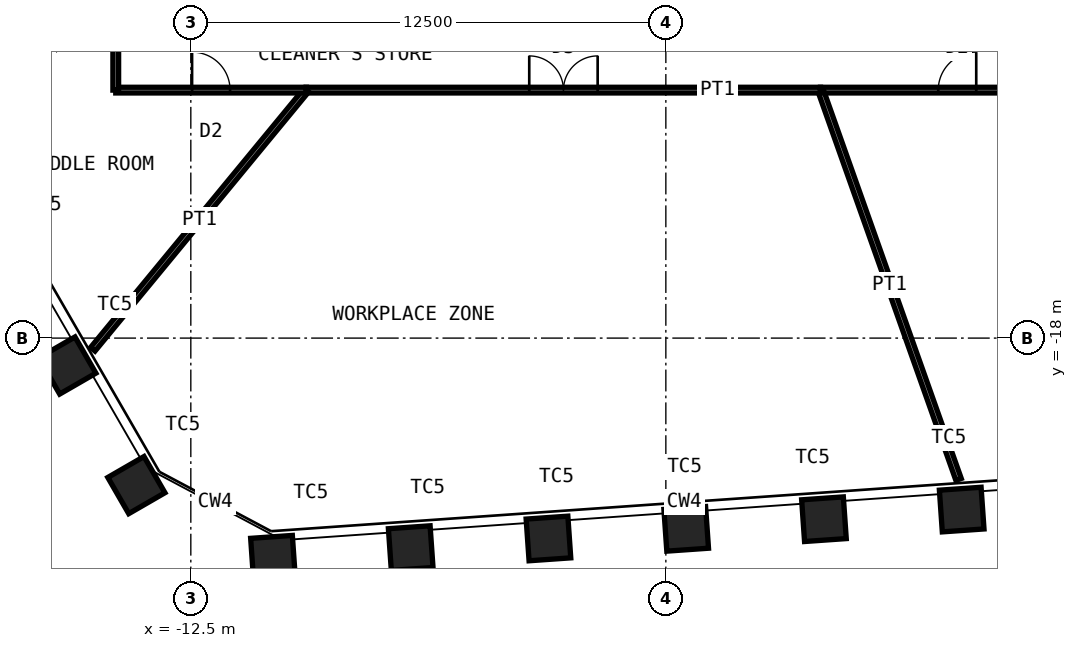
"""IFC4 building model, lengths in metres.
Left out: names, types, materials, properties, quantities, classifications, styles, units other than length and angle.
Written with IfcOpenShell. Run it as: python <this file> out.ifc"""

import sys

from ifc_helpers import new_model, si_unit, direction, frame, frame_2d, origin, origin_2d, place, context, subcontext, project, spatial, rectangle, hollow_rectangle, extrude, element, fill, save


model = new_model("IFC4")
c1 = context("Model", 3, precision=1e-05, world=origin(), true_north=direction((0.0, 1.0)))
c2 = subcontext(c1, "Body", "Model", "MODEL_VIEW")
j1 = project(units=[si_unit("LENGTHUNIT", "METRE"), si_unit("PLANEANGLEUNIT", "RADIAN")], contexts=[c1])
p1 = place(None, origin())
s1 = spatial("IfcSite", under=j1, at=p1, CompositionType="ELEMENT")
p2 = place(p1, origin())
s2 = spatial("IfcBuilding", under=s1, at=p2, CompositionType="ELEMENT")
p3 = place(p2, frame((0.0, 0.0, 193.0)))
s3 = spatial("IfcBuildingStorey", under=s2, at=p3, CompositionType="ELEMENT", Elevation=193.0)
for number, where, z_axis, x_axis in (
    (1, (7.785, -22.512, 0.0), (0.0, 0.0, 1.0), (0.998, 0.07, 0.0)),
    (2, (4.16, -22.765, 0.0), (0.0, 0.0, 1.0), (0.998, 0.07, 0.0)),
    (3, (0.536, -23.019, 0.0), (0.0, 0.0, 1.0), (0.998, 0.07, 0.0)),
    (4, (-3.089, -23.272, 0.0), (0.0, 0.0, 1.0), (0.998, 0.07, 0.0)),
    (5, (-6.714, -23.526, 0.0), (0.0, 0.0, 1.0), (0.998, 0.07, 0.0)),
    (6, (-10.338, -23.779, 0.0), (0.0, 0.0, 1.0), (0.998, 0.07, 0.0)),
    (7, (-13.933, -21.868, 0.0), (0.0, 0.0, 1.0), (0.5, -0.866, 0.0)),
    (8, (-15.749, -18.721, 0.0), (0.0, 0.0, 1.0), (0.5, -0.866, 0.0)),
):
    element("IfcColumn", number, at=place(p3, frame(where, z_axis=z_axis, x_axis=x_axis)), inside=s3, PredefinedType="COLUMN", context=c2, shape_type="SweptSolid", body=[
        extrude(hollow_rectangle(XDim=1.1, YDim=1.1, WallThickness=0.07, at=origin_2d()), origin(), (0.0, 0.0, 1.0), 4.2),
    ])
p4 = place(p3, frame((11.266, -11.475, 0.0), z_axis=(0.0, 0.0, 1.0), x_axis=(-1.0, 0.0, 0.0)))
e9 = element("IfcWall", 9, at=p4, inside=s3, PredefinedType="PARTITIONING", context=c2, shape_type="SweptSolid", body=[
    extrude(rectangle(XDim=7.196, YDim=0.15, at=frame_2d((3.598, 0.0))), origin(), (0.0, 0.0, 1.0), 4.03),
])
p5 = place(p4, frame((3.098, 0.0, 0.0)))
e10 = element("IfcOpeningElement", 10, at=p5, cuts=e9, PredefinedType="OPENING", context=c2, shape_type="SweptSolid", body=[
    extrude(rectangle(XDim=1.0, YDim=2.4, at=frame_2d((0.5, 1.2))), frame((0.0, 0.085, 0.0), z_axis=(0.0, -1.0, 0.0), x_axis=(1.0, 0.0, 0.0)), (0.0, 0.0, 1.0), 0.17),
])
p6 = place(p3, frame((7.703, -21.719, 0.0), z_axis=(0.0, 0.0, 1.0), x_axis=(-0.334269551553, 0.942477515331, 0.0)))
e11 = element("IfcWall", 11, at=p6, inside=s3, PredefinedType="PARTITIONING", context=c2, shape_type="SweptSolid", body=[
    extrude(rectangle(XDim=10.869, YDim=0.15, at=frame_2d((5.435, 0.0))), origin(), (0.0, 0.0, 1.0), 3.43),
])
p7 = place(p3, frame((4.07, -11.475, 0.0), z_axis=(0.0, 0.0, 1.0), x_axis=(-1.0, 0.0, 0.0)))
e12 = element("IfcWall", 12, at=p7, inside=s3, PredefinedType="PARTITIONING", context=c2, shape_type="SweptSolid", body=[
    extrude(rectangle(XDim=13.528, YDim=0.15, at=frame_2d((6.764, 0.0))), origin(), (0.0, 0.0, 1.0), 4.03),
])
p8 = place(p7, frame((5.864, 0.0, 0.0)))
e13 = element("IfcOpeningElement", 13, at=p8, cuts=e12, PredefinedType="OPENING", context=c2, shape_type="SweptSolid", body=[
    extrude(rectangle(XDim=1.8, YDim=2.4, at=frame_2d((0.9, 1.2))), frame((0.0, 0.085, 0.0), z_axis=(0.0, -1.0, 0.0), x_axis=(1.0, 0.0, 0.0)), (0.0, 0.0, 1.0), 0.17),
])
p9 = place(p3, frame((-15.08, -18.294, 0.0), z_axis=(0.0, 0.0, 1.0), x_axis=(0.636052894953, 0.771645459277, 0.0)))
e14 = element("IfcWall", 14, at=p9, inside=s3, PredefinedType="PARTITIONING", context=c2, shape_type="SweptSolid", body=[
    extrude(rectangle(XDim=8.837, YDim=0.15, at=frame_2d((4.418, 0.0))), origin(), (0.0, 0.0, 1.0), 3.43),
])
p10 = place(p3, frame((-9.459, -11.475, 0.0), z_axis=(0.0, 0.0, 1.0), x_axis=(-1.0, 0.0, 0.0)))
e15 = element("IfcWall", 15, at=p10, inside=s3, PredefinedType="PARTITIONING", context=c2, shape_type="SweptSolid", body=[
    extrude(rectangle(XDim=5.016, YDim=0.15, at=frame_2d((2.508, 0.0))), origin(), (0.0, 0.0, 1.0), 4.03),
])
p11 = place(p10, frame((2.008, 0.0, 0.0)))
e16 = element("IfcOpeningElement", 16, at=p11, cuts=e15, PredefinedType="OPENING", context=c2, shape_type="SweptSolid", body=[
    extrude(rectangle(XDim=1.0, YDim=2.4, at=frame_2d((0.5, 1.2))), frame((0.0, 0.085, 0.0), z_axis=(0.0, -1.0, 0.0), x_axis=(1.0, 0.0, 0.0)), (0.0, 0.0, 1.0), 0.17),
])
p12 = place(p3, frame((-14.475, -11.475, 0.0), z_axis=(0.0, 0.0, 1.0), x_axis=(0.0, 1.0, 0.0)))
e17 = element("IfcWall", 17, at=p12, inside=s3, PredefinedType="PARTITIONING", context=c2, shape_type="SweptSolid", body=[
    extrude(rectangle(XDim=2.164, YDim=0.15, at=frame_2d((1.082, 0.0))), origin(), (0.0, 0.0, 1.0), 4.03),
])
p13 = place(p3, frame((-18.693, -12.024, 0.0), z_axis=(0.0, 0.0, 1.0), x_axis=(0.841031335058, 0.540986407824, 0.0)))
e18 = element("IfcWall", 18, at=p13, inside=s3, PredefinedType="PARTITIONING", context=c2, shape_type="SweptSolid", body=[
    extrude(rectangle(XDim=5.015, YDim=0.15, at=frame_2d((2.507, 0.0))), origin(), (0.0, 0.0, 1.0), 3.43),
])
p14 = place(p5, origin())
e19 = element("IfcDoor", 19, at=p14, inside=s3, OperationType="SINGLE_SWING_LEFT", PredefinedType="DOOR", context=c2, shape_type="SweptSolid", body=[
    extrude(rectangle(XDim=1.0, YDim=2.4, at=frame_2d((0.5, 1.2))), frame((0.0, 0.025, 0.0), z_axis=(0.0, -1.0, 0.0), x_axis=(1.0, 0.0, 0.0)), (0.0, 0.0, 1.0), 0.05),
])
fill(e10, e19)
p15 = place(p8, origin())
e20 = element("IfcDoor", 20, at=p15, inside=s3, OperationType="DOUBLE_DOOR_DOUBLE_SWING", PredefinedType="DOOR", context=c2, shape_type="SweptSolid", body=[
    extrude(rectangle(XDim=1.8, YDim=2.4, at=frame_2d((0.9, 1.2))), frame((0.0, 0.025, 0.0), z_axis=(0.0, -1.0, 0.0), x_axis=(1.0, 0.0, 0.0)), (0.0, 0.0, 1.0), 0.05),
])
fill(e13, e20)
p16 = place(p11, origin())
e21 = element("IfcDoor", 21, at=p16, inside=s3, OperationType="SINGLE_SWING_RIGHT", PredefinedType="DOOR", context=c2, shape_type="SweptSolid", body=[
    extrude(rectangle(XDim=1.0, YDim=2.4, at=frame_2d((0.5, 1.2))), frame((0.0, 0.025, 0.0), z_axis=(0.0, -1.0, 0.0), x_axis=(1.0, 0.0, 0.0)), (0.0, 0.0, 1.0), 0.05),
])
fill(e16, e21)
save(model, sys.argv[1])
